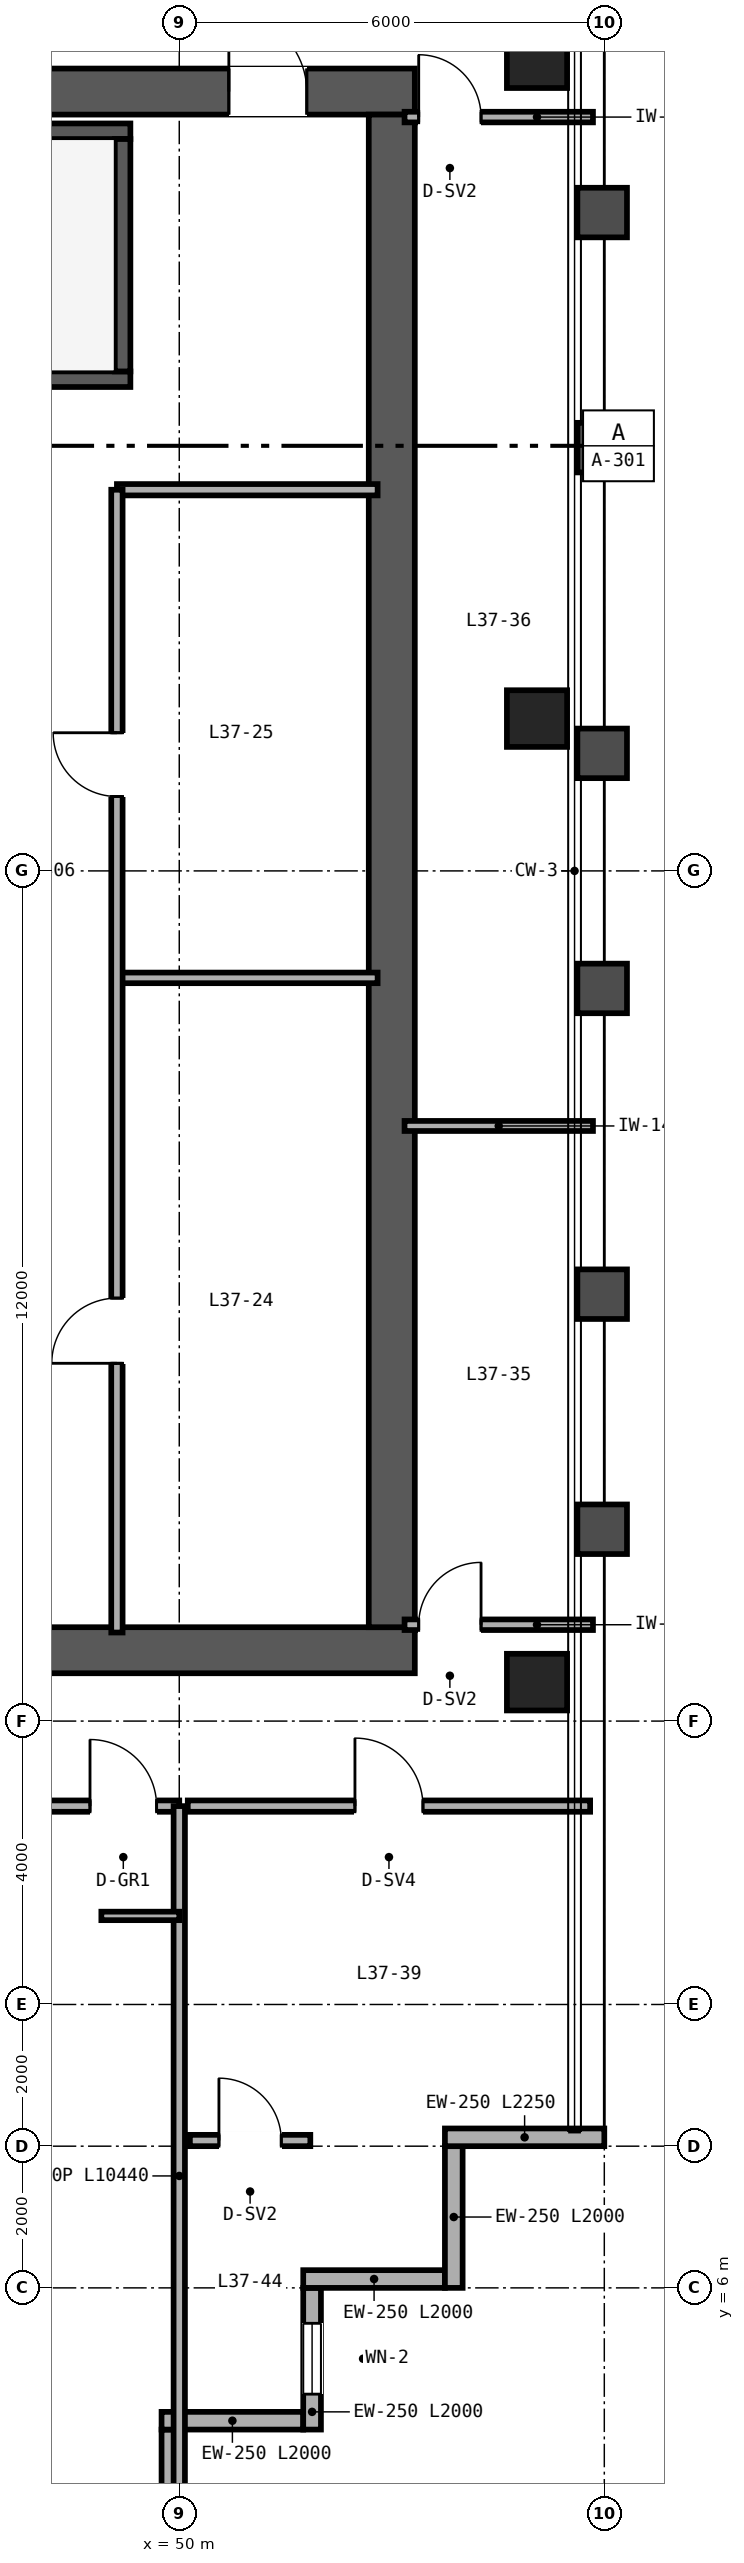
"""IFC4 building model, lengths in metres.
Left out: names, types, materials, properties, quantities, classifications, styles, units other than length and angle.
Written with IfcOpenShell. Run it as: python <this file> out.ifc"""

import sys

from ifc_helpers import new_model, si_unit, direction, frame, frame_2d, origin, origin_2d, place, context, subcontext, project, spatial, rectangle, hollow_rectangle, extrude, source, transform, mapped, element, fill, save


model = new_model("IFC4")
c1 = context("Model", 3, precision=1e-05, world=origin(), true_north=direction((0.0, 1.0)))
c2 = subcontext(c1, "Body", "Model", "MODEL_VIEW")
j1 = project(units=[si_unit("LENGTHUNIT", "METRE"), si_unit("PLANEANGLEUNIT", "RADIAN")], contexts=[c1])
p1 = place(None, origin())
s1 = spatial("IfcSite", under=j1, at=p1, CompositionType="ELEMENT")
p2 = place(p1, origin())
s2 = spatial("IfcBuilding", under=s1, at=p2, CompositionType="ELEMENT")
p3 = place(p2, frame((0.0, 0.0, 147.6)))
s3 = spatial("IfcBuildingStorey", under=s2, at=p3, CompositionType="ELEMENT", Elevation=147.6)
p4 = place(p3, frame((40.675, 15.0, 0.0), z_axis=(0.0, 0.0, 1.0), x_axis=(1.0, 0.0, 0.0)))
e1 = element("IfcWall", 1, at=p4, inside=s3, PredefinedType="SHEAR", context=c2, shape_type="SweptSolid", body=[
    extrude(rectangle(XDim=12.65, YDim=0.65, at=frame_2d((6.325, 0.0))), origin(), (0.0, 0.0, 1.0), 3.28),
])
p5 = place(p4, frame((4.425, 0.0, 0.0)))
e2 = element("IfcOpeningElement", 2, at=p5, cuts=e1, PredefinedType="OPENING", context=c2, shape_type="SweptSolid", body=[
    extrude(rectangle(XDim=1.0, YDim=2.15, at=frame_2d((0.5, 1.075))), frame((0.0, 0.335, 0.0), z_axis=(0.0, -1.0, 0.0), x_axis=(1.0, 0.0, 0.0)), (0.0, 0.0, 1.0), 0.67),
])
p6 = place(p3, frame((40.675, 37.0, 0.0), z_axis=(0.0, 0.0, 1.0), x_axis=(1.0, 0.0, 0.0)))
e3 = element("IfcWall", 3, at=p6, inside=s3, PredefinedType="SHEAR", context=c2, shape_type="SweptSolid", body=[
    extrude(rectangle(XDim=12.65, YDim=0.65, at=frame_2d((6.325, 0.0))), origin(), (0.0, 0.0, 1.0), 3.28),
])
p7 = place(p6, frame((10.025, 0.0, 0.0)))
e4 = element("IfcOpeningElement", 4, at=p7, cuts=e3, PredefinedType="OPENING", context=c2, shape_type="SweptSolid", body=[
    extrude(rectangle(XDim=1.1, YDim=2.15, at=frame_2d((0.55, 1.075))), frame((0.0, 0.335, 0.0), z_axis=(0.0, -1.0, 0.0), x_axis=(1.0, 0.0, 0.0)), (0.0, 0.0, 1.0), 0.67),
])
p8 = place(p3, frame((53.0, 15.325, 0.0), z_axis=(0.0, 0.0, 1.0), x_axis=(0.0, 1.0, 0.0)))
e5 = element("IfcWall", 5, at=p8, inside=s3, PredefinedType="SHEAR", context=c2, shape_type="SweptSolid", body=[
    extrude(rectangle(XDim=21.35, YDim=0.65, at=frame_2d((10.675, 0.0))), origin(), (0.0, 0.0, 1.0), 3.28),
])
p9 = place(p3, frame((41.325, 32.94, 0.0), z_axis=(0.0, 0.0, 1.0), x_axis=(1.0, 0.0, 0.0)))
e6 = element("IfcWall", 6, at=p9, inside=s3, PredefinedType="SHEAR", context=c2, shape_type="SweptSolid", body=[
    extrude(rectangle(XDim=7.985, YDim=0.22, at=frame_2d((3.993, 0.0))), origin(), (0.0, 0.0, 1.0), 3.4),
])
p10 = place(p9, frame((0.595, 0.0, 0.0)))
e7 = element("IfcOpeningElement", 7, at=p10, cuts=e6, PredefinedType="OPENING", context=c2, shape_type="SweptSolid", body=[
    extrude(rectangle(XDim=1.05, YDim=2.15, at=frame_2d((0.525, 1.075))), frame((0.0, 0.12, 0.0), z_axis=(0.0, -1.0, 0.0), x_axis=(1.0, 0.0, 0.0)), (0.0, 0.0, 1.0), 0.24),
])
p11 = place(p3, frame((41.325, 36.44, 0.0), z_axis=(0.0, 0.0, 1.0), x_axis=(1.0, 0.0, 0.0)))
e8 = element("IfcWall", 8, at=p11, inside=s3, PredefinedType="SHEAR", context=c2, shape_type="SweptSolid", body=[
    extrude(rectangle(XDim=7.985, YDim=0.22, at=frame_2d((3.993, 0.0))), origin(), (0.0, 0.0, 1.0), 3.4),
])
p12 = place(p3, frame((49.2, 33.05, 0.0), z_axis=(0.0, 0.0, 1.0), x_axis=(0.0, 1.0, 0.0)))
e9 = element("IfcWall", 9, at=p12, inside=s3, PredefinedType="SHEAR", context=c2, shape_type="SweptSolid", body=[
    extrude(rectangle(XDim=3.28, YDim=0.22, at=frame_2d((1.64, 0.0))), origin(), (0.0, 0.0, 1.0), 3.4),
])
m1 = source(origin(), c2, "Body", "SweptSolid", [
    extrude(hollow_rectangle(XDim=0.85, YDim=0.8, WallThickness=0.032, at=origin_2d()), origin(), (0.0, 0.0, 1.0), 3.28),
])
for number, where, z_axis, x_axis in (
    (10, (55.05, 14.55, 0.0), (0.0, 0.0, 1.0), (1.0, 0.0, 0.0)),
    (11, (55.05, 28.15, 0.0), (0.0, 0.0, 1.0), (1.0, 0.0, 0.0)),
    (12, (55.05, 37.45, 0.0), (0.0, 0.0, 1.0), (1.0, 0.0, 0.0)),
):
    element("IfcColumn", number, at=place(p3, frame(where, z_axis=z_axis, x_axis=x_axis)), inside=s3, PredefinedType="COLUMN", context=c2, shape_type="MappedRepresentation", body=[
        mapped(m1, transform((0.0, 0.0, 0.0), scale=1.0)),
    ])
p13 = place(p3, frame((49.875, 2.0, 0.0), z_axis=(0.0, 0.0, 1.0), x_axis=(0.0, 1.0, 0.0)))
e13 = element("IfcWall", 13, at=p13, inside=s3, PredefinedType="SOLIDWALL", context=c2, shape_type="SweptSolid", body=[
    extrude(rectangle(XDim=2.0, YDim=0.25, at=frame_2d((1.0, 0.0))), origin(), (0.0, 0.0, 1.0), 2.587),
])
p14 = place(p3, frame((49.75, 4.125, 0.0), z_axis=(0.0, 0.0, 1.0), x_axis=(1.0, 0.0, 0.0)))
e14 = element("IfcWall", 14, at=p14, inside=s3, PredefinedType="SOLIDWALL", context=c2, shape_type="SweptSolid", body=[
    extrude(rectangle(XDim=2.0, YDim=0.25, at=frame_2d((1.0, 0.0))), origin(), (0.0, 0.0, 1.0), 3.28),
])
p15 = place(p3, frame((51.875, 4.0, 0.0), z_axis=(0.0, 0.0, 1.0), x_axis=(0.0, 1.0, 0.0)))
e15 = element("IfcWall", 15, at=p15, inside=s3, PredefinedType="SOLIDWALL", context=c2, shape_type="SweptSolid", body=[
    extrude(rectangle(XDim=2.0, YDim=0.25, at=frame_2d((1.0, 0.0))), origin(), (0.0, 0.0, 1.0), 3.28),
])
p16 = place(p15, frame((0.5, 0.0, 0.85)))
e16 = element("IfcOpeningElement", 16, at=p16, cuts=e15, PredefinedType="OPENING", context=c2, shape_type="SweptSolid", body=[
    extrude(rectangle(XDim=1.0, YDim=1.9, at=frame_2d((0.5, 0.95))), frame((0.0, 0.135, 0.0), z_axis=(0.0, -1.0, 0.0), x_axis=(1.0, 0.0, 0.0)), (0.0, 0.0, 1.0), 0.27),
])
for number, where, z_axis, x_axis in (
    (17, (51.75, 6.125, 0.0), (0.0, 0.0, 1.0), (1.0, 0.0, 0.0)),
    (18, (53.875, 6.0, 0.0), (0.0, 0.0, 1.0), (0.0, 1.0, 0.0)),
):
    element("IfcWall", number, at=place(p3, frame(where, z_axis=z_axis, x_axis=x_axis)), inside=s3, PredefinedType="SOLIDWALL", context=c2, shape_type="SweptSolid", body=[
        extrude(rectangle(XDim=2.0, YDim=0.25, at=frame_2d((1.0, 0.0))), origin(), (0.0, 0.0, 1.0), 3.28),
    ])
p17 = place(p3, frame((53.75, 8.125, 0.0), z_axis=(0.0, 0.0, 1.0), x_axis=(1.0, 0.0, 0.0)))
e19 = element("IfcWall", 19, at=p17, inside=s3, PredefinedType="SOLIDWALL", context=c2, shape_type="SweptSolid", body=[
    extrude(rectangle(XDim=2.25, YDim=0.25, at=frame_2d((1.125, 0.0))), origin(), (0.0, 0.0, 1.0), 3.28),
])
p18 = place(p3, frame((49.12, 31.38, 0.0), z_axis=(0.0, 0.0, 1.0), x_axis=(1.0, 0.0, 0.0)))
e20 = element("IfcWall", 20, at=p18, inside=s3, PredefinedType="PARTITIONING", context=c2, shape_type="SweptSolid", body=[
    extrude(rectangle(XDim=3.68, YDim=0.16, at=frame_2d((1.84, 0.0))), origin(), (0.0, 0.0, 1.0), 2.36),
])
p19 = place(p3, frame((49.12, 24.49, 0.0), z_axis=(0.0, 0.0, 1.0), x_axis=(1.0, 0.0, 0.0)))
e21 = element("IfcWall", 21, at=p19, inside=s3, PredefinedType="PARTITIONING", context=c2, shape_type="SweptSolid", body=[
    extrude(rectangle(XDim=3.68, YDim=0.15, at=frame_2d((1.84, 0.0))), origin(), (0.0, 0.0, 1.0), 3.28),
])
p20 = place(p3, frame((49.12, 15.25, 0.0), z_axis=(0.0, 0.0, 1.0), x_axis=(0.0, 1.0, 0.0)))
e22 = element("IfcWall", 22, at=p20, inside=s3, PredefinedType="PARTITIONING", context=c2, shape_type="SweptSolid", body=[
    extrude(rectangle(XDim=16.13, YDim=0.16, at=frame_2d((8.065, 0.0))), origin(), (0.0, 0.0, 1.0), 2.36),
])
p21 = place(p20, frame((3.8, 0.0, 0.0)))
e23 = element("IfcOpeningElement", 23, at=p21, cuts=e22, PredefinedType="OPENING", context=c2, shape_type="SweptSolid", body=[
    extrude(rectangle(XDim=0.92, YDim=2.15, at=frame_2d((0.46, 1.075))), frame((0.0, 0.09, 0.0), z_axis=(0.0, -1.0, 0.0), x_axis=(1.0, 0.0, 0.0)), (0.0, 0.0, 1.0), 0.18),
])
p22 = place(p20, frame((11.8, 0.0, 0.0)))
e24 = element("IfcOpeningElement", 24, at=p22, cuts=e22, PredefinedType="OPENING", context=c2, shape_type="SweptSolid", body=[
    extrude(rectangle(XDim=0.9, YDim=2.15, at=frame_2d((0.45, 1.075))), frame((0.0, 0.09, 0.0), z_axis=(0.0, -1.0, 0.0), x_axis=(1.0, 0.0, 0.0)), (0.0, 0.0, 1.0), 0.18),
])
p23 = place(p3, frame((53.18, 15.36, 0.0), z_axis=(0.0, 0.0, 1.0), x_axis=(1.0, 0.0, 0.0)))
e25 = element("IfcWall", 25, at=p23, inside=s3, PredefinedType="PARTITIONING", context=c2, shape_type="SweptSolid", body=[
    extrude(rectangle(XDim=2.66, YDim=0.15, at=frame_2d((1.33, 0.0))), origin(), (0.0, 0.0, 1.0), 2.501),
])
p24 = place(p23, frame((0.2, 0.0, 0.0)))
e26 = element("IfcOpeningElement", 26, at=p24, cuts=e25, PredefinedType="OPENING", context=c2, shape_type="SweptSolid", body=[
    extrude(rectangle(XDim=0.88, YDim=2.15, at=frame_2d((0.44, 1.075))), frame((0.0, 0.085, 0.0), z_axis=(0.0, -1.0, 0.0), x_axis=(1.0, 0.0, 0.0)), (0.0, 0.0, 1.0), 0.17),
])
p25 = place(p3, frame((53.18, 36.64, 0.0), z_axis=(0.0, 0.0, 1.0), x_axis=(1.0, 0.0, 0.0)))
e27 = element("IfcWall", 27, at=p25, inside=s3, PredefinedType="PARTITIONING", context=c2, shape_type="SweptSolid", body=[
    extrude(rectangle(XDim=2.66, YDim=0.15, at=frame_2d((1.33, 0.0))), origin(), (0.0, 0.0, 1.0), 2.663),
])
p26 = place(p25, frame((0.2, 0.0, 0.0)))
e28 = element("IfcOpeningElement", 28, at=p26, cuts=e27, PredefinedType="OPENING", context=c2, shape_type="SweptSolid", body=[
    extrude(rectangle(XDim=0.88, YDim=2.15, at=frame_2d((0.44, 1.075))), frame((0.0, 0.085, 0.0), z_axis=(0.0, -1.0, 0.0), x_axis=(1.0, 0.0, 0.0)), (0.0, 0.0, 1.0), 0.17),
])
p27 = place(p3, frame((53.18, 22.4, 0.0), z_axis=(0.0, 0.0, 1.0), x_axis=(1.0, 0.0, 0.0)))
e29 = element("IfcWall", 29, at=p27, inside=s3, PredefinedType="PARTITIONING", context=c2, shape_type="SweptSolid", body=[
    extrude(rectangle(XDim=2.66, YDim=0.142, at=frame_2d((1.33, 0.0))), origin(), (0.0, 0.0, 1.0), 2.501),
])
p28 = place(p3, frame((50.12, 12.8, 0.0), z_axis=(0.0, 0.0, 1.0), x_axis=(1.0, 0.0, 0.0)))
e30 = element("IfcWall", 30, at=p28, inside=s3, PredefinedType="PARTITIONING", context=c2, shape_type="SweptSolid", body=[
    extrude(rectangle(XDim=5.68, YDim=0.16, at=frame_2d((2.84, 0.0))), origin(), (0.0, 0.0, 1.0), 3.28),
])
p29 = place(p28, frame((2.36, 0.0, 0.0)))
e31 = element("IfcOpeningElement", 31, at=p29, cuts=e30, PredefinedType="OPENING", context=c2, shape_type="SweptSolid", body=[
    extrude(rectangle(XDim=0.96, YDim=2.15, at=frame_2d((0.48, 1.075))), frame((0.0, 0.09, 0.0), z_axis=(0.0, -1.0, 0.0), x_axis=(1.0, 0.0, 0.0)), (0.0, 0.0, 1.0), 0.18),
])
p30 = place(p3, frame((50.15, 8.08, 0.0), z_axis=(0.0, 0.0, 1.0), x_axis=(1.0, 0.0, 0.0)))
e32 = element("IfcWall", 32, at=p30, inside=s3, PredefinedType="PARTITIONING", context=c2, shape_type="SweptSolid", body=[
    extrude(rectangle(XDim=1.7, YDim=0.16, at=frame_2d((0.85, 0.0))), origin(), (0.0, 0.0, 1.0), 3.28),
])
p31 = place(p30, frame((0.41, 0.0, 0.0)))
e33 = element("IfcOpeningElement", 33, at=p31, cuts=e32, PredefinedType="OPENING", context=c2, shape_type="SweptSolid", body=[
    extrude(rectangle(XDim=0.88, YDim=2.15, at=frame_2d((0.44, 1.075))), frame((0.0, 0.09, 0.0), z_axis=(0.0, -1.0, 0.0), x_axis=(1.0, 0.0, 0.0)), (0.0, 0.0, 1.0), 0.18),
])
p32 = place(p3, frame((14.0, 12.8, 0.0), z_axis=(0.0, 0.0, 1.0), x_axis=(1.0, 0.0, 0.0)))
e34 = element("IfcWall", 34, at=p32, inside=s3, PredefinedType="PARTITIONING", context=c2, shape_type="SweptSolid", body=[
    extrude(rectangle(XDim=36.0, YDim=0.16, at=frame_2d((18.0, 0.0))), origin(), (0.0, 0.0, 1.0), 2.501),
])
p33 = place(p32, frame((5.5, 0.0, 0.0)))
e35 = element("IfcOpeningElement", 35, at=p33, cuts=e34, PredefinedType="OPENING", context=c2, shape_type="SweptSolid", body=[
    extrude(rectangle(XDim=0.98, YDim=2.2, at=frame_2d((0.49, 1.1))), frame((0.0, 0.09, 0.0), z_axis=(0.0, -1.0, 0.0), x_axis=(1.0, 0.0, 0.0)), (0.0, 0.0, 1.0), 0.18),
])
p34 = place(p32, frame((10.2, 0.0, 0.0)))
e36 = element("IfcOpeningElement", 36, at=p34, cuts=e34, PredefinedType="OPENING", context=c2, shape_type="SweptSolid", body=[
    extrude(rectangle(XDim=0.96, YDim=2.15, at=frame_2d((0.48, 1.075))), frame((0.0, 0.09, 0.0), z_axis=(0.0, -1.0, 0.0), x_axis=(1.0, 0.0, 0.0)), (0.0, 0.0, 1.0), 0.18),
])
p35 = place(p32, frame((16.72, 0.0, 0.0)))
e37 = element("IfcOpeningElement", 37, at=p35, cuts=e34, PredefinedType="OPENING", context=c2, shape_type="SweptSolid", body=[
    extrude(rectangle(XDim=0.96, YDim=2.15, at=frame_2d((0.48, 1.075))), frame((0.0, 0.09, 0.0), z_axis=(0.0, -1.0, 0.0), x_axis=(1.0, 0.0, 0.0)), (0.0, 0.0, 1.0), 0.18),
])
p36 = place(p32, frame((27.14, 0.0, 0.0)))
e38 = element("IfcOpeningElement", 38, at=p36, cuts=e34, PredefinedType="OPENING", context=c2, shape_type="SweptSolid", body=[
    extrude(rectangle(XDim=0.94, YDim=2.15, at=frame_2d((0.47, 1.075))), frame((0.0, 0.09, 0.0), z_axis=(0.0, -1.0, 0.0), x_axis=(1.0, 0.0, 0.0)), (0.0, 0.0, 1.0), 0.18),
])
p37 = place(p32, frame((34.74, 0.0, 0.0)))
e39 = element("IfcOpeningElement", 39, at=p37, cuts=e34, PredefinedType="OPENING", context=c2, shape_type="SweptSolid", body=[
    extrude(rectangle(XDim=0.94, YDim=2.15, at=frame_2d((0.47, 1.075))), frame((0.0, 0.09, 0.0), z_axis=(0.0, -1.0, 0.0), x_axis=(1.0, 0.0, 0.0)), (0.0, 0.0, 1.0), 0.18),
])
p38 = place(p3, frame((50.0, 2.36, 0.0), z_axis=(0.0, 0.0, 1.0), x_axis=(0.0, 1.0, 0.0)))
e40 = element("IfcWall", 40, at=p38, inside=s3, PredefinedType="PARTITIONING", context=c2, shape_type="SweptSolid", body=[
    extrude(rectangle(XDim=10.44, YDim=0.16, at=frame_2d((5.22, 0.0))), origin(), (0.0, 0.0, 1.0), 2.587),
])
p39 = place(p3, frame((48.9, 11.25, 0.0), z_axis=(0.0, 0.0, 1.0), x_axis=(1.0, 0.0, 0.0)))
e41 = element("IfcWall", 41, at=p39, inside=s3, PredefinedType="PARTITIONING", context=c2, shape_type="SweptSolid", body=[
    extrude(rectangle(XDim=1.1, YDim=0.12, at=frame_2d((0.55, 0.0))), origin(), (0.0, 0.0, 1.0), 3.28),
])
m2 = source(origin(), c2, "Body", "SweptSolid", [
    extrude(rectangle(XDim=1.0, YDim=1.9, at=frame_2d((0.5, 0.95))), frame((0.0, 0.03, 0.0), z_axis=(0.0, -1.0, 0.0), x_axis=(1.0, 0.0, 0.0)), (0.0, 0.0, 1.0), 0.06),
])
p40 = place(p16, origin())
e42 = element("IfcWindow", 42, at=p40, inside=s3, PartitioningType="SINGLE_PANEL", PredefinedType="WINDOW", context=c2, shape_type="MappedRepresentation", body=[
    mapped(m2, transform((0.0, 0.0, 0.0), scale=1.0)),
])
fill(e16, e42)
m3 = source(origin(), c2, "Body", "SweptSolid", [
    extrude(rectangle(XDim=1.1, YDim=2.15, at=frame_2d((0.55, 1.075))), frame((0.0, 0.025, 0.0), z_axis=(0.0, -1.0, 0.0), x_axis=(1.0, 0.0, 0.0)), (0.0, 0.0, 1.0), 0.05),
])
p41 = place(p7, origin())
e43 = element("IfcDoor", 43, at=p41, inside=s3, OperationType="SINGLE_SWING_LEFT", PredefinedType="DOOR", context=c2, shape_type="MappedRepresentation", body=[
    mapped(m3, transform((0.0, 0.0, 0.0), scale=1.0)),
])
fill(e4, e43)
m4 = source(origin(), c2, "Body", "SweptSolid", [
    extrude(rectangle(XDim=0.92, YDim=2.15, at=frame_2d((0.46, 1.075))), frame((0.0, 0.025, 0.0), z_axis=(0.0, -1.0, 0.0), x_axis=(1.0, 0.0, 0.0)), (0.0, 0.0, 1.0), 0.05),
])
p42 = place(p21, origin())
e44 = element("IfcDoor", 44, at=p42, inside=s3, OperationType="SINGLE_SWING_LEFT", PredefinedType="DOOR", context=c2, shape_type="MappedRepresentation", body=[
    mapped(m4, transform((0.0, 0.0, 0.0), scale=1.0)),
])
fill(e23, e44)
m5 = source(origin(), c2, "Body", "SweptSolid", [
    extrude(rectangle(XDim=0.9, YDim=2.15, at=frame_2d((0.45, 1.075))), frame((0.0, 0.025, 0.0), z_axis=(0.0, -1.0, 0.0), x_axis=(1.0, 0.0, 0.0)), (0.0, 0.0, 1.0), 0.05),
])
p43 = place(p22, origin())
e45 = element("IfcDoor", 45, at=p43, inside=s3, OperationType="SINGLE_SWING_RIGHT", PredefinedType="DOOR", context=c2, shape_type="MappedRepresentation", body=[
    mapped(m5, transform((0.0, 0.0, 0.0), scale=1.0)),
])
fill(e24, e45)
m6 = source(origin(), c2, "Body", "SweptSolid", [
    extrude(rectangle(XDim=0.88, YDim=2.15, at=frame_2d((0.44, 1.075))), frame((0.0, 0.025, 0.0), z_axis=(0.0, -1.0, 0.0), x_axis=(1.0, 0.0, 0.0)), (0.0, 0.0, 1.0), 0.05),
])
p44 = place(p24, origin())
e46 = element("IfcDoor", 46, at=p44, inside=s3, OperationType="SINGLE_SWING_RIGHT", PredefinedType="DOOR", context=c2, shape_type="MappedRepresentation", body=[
    mapped(m6, transform((0.0, 0.0, 0.0), scale=1.0)),
])
fill(e26, e46)
p45 = place(p26, origin())
e47 = element("IfcDoor", 47, at=p45, inside=s3, OperationType="SINGLE_SWING_LEFT", PredefinedType="DOOR", context=c2, shape_type="MappedRepresentation", body=[
    mapped(m6, transform((0.0, 0.0, 0.0), scale=1.0)),
])
fill(e28, e47)
m7 = source(origin(), c2, "Body", "SweptSolid", [
    extrude(rectangle(XDim=0.96, YDim=2.15, at=frame_2d((0.48, 1.075))), frame((0.0, 0.025, 0.0), z_axis=(0.0, -1.0, 0.0), x_axis=(1.0, 0.0, 0.0)), (0.0, 0.0, 1.0), 0.05),
])
p46 = place(p29, origin())
e48 = element("IfcDoor", 48, at=p46, inside=s3, OperationType="SINGLE_SWING_LEFT", PredefinedType="DOOR", context=c2, shape_type="MappedRepresentation", body=[
    mapped(m7, transform((0.0, 0.0, 0.0), scale=1.0)),
])
fill(e31, e48)
p47 = place(p31, origin())
e49 = element("IfcDoor", 49, at=p47, inside=s3, OperationType="SINGLE_SWING_LEFT", PredefinedType="DOOR", context=c2, shape_type="MappedRepresentation", body=[
    mapped(m6, transform((0.0, 0.0, 0.0), scale=1.0)),
])
fill(e33, e49)
m8 = source(origin(), c2, "Body", "SweptSolid", [
    extrude(rectangle(XDim=0.94, YDim=2.15, at=frame_2d((0.47, 1.075))), frame((0.0, 0.025, 0.0), z_axis=(0.0, -1.0, 0.0), x_axis=(1.0, 0.0, 0.0)), (0.0, 0.0, 1.0), 0.05),
])
p48 = place(p37, origin())
e50 = element("IfcDoor", 50, at=p48, inside=s3, OperationType="SINGLE_SWING_LEFT", PredefinedType="DOOR", context=c2, shape_type="MappedRepresentation", body=[
    mapped(m8, transform((0.0, 0.0, 0.0), scale=1.0)),
])
fill(e39, e50)
save(model, sys.argv[1])
